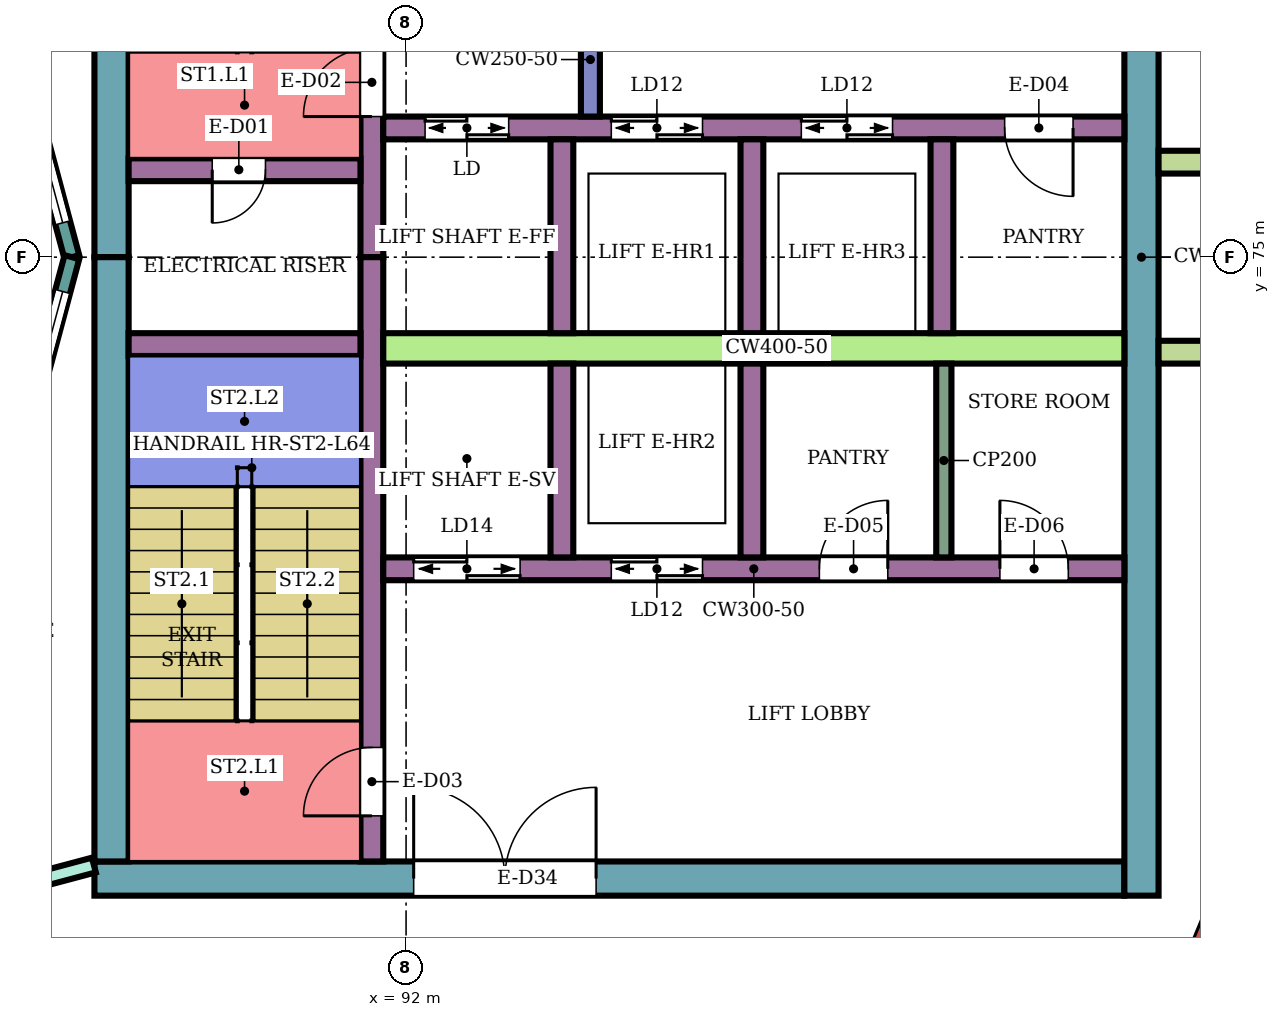
"""IFC4 building model, lengths in metres.
Left out: names, types, materials, properties, quantities, classifications, styles, units other than length and angle.
Written with IfcOpenShell. Run it as: python <this file> out.ifc"""

import sys

from ifc_helpers import new_model, si_unit, direction, frame, frame_2d, origin, place, context, subcontext, project, spatial, rectangle, extrude, element, fill, save


model = new_model("IFC4")
c1 = context("Model", 3, precision=1e-05, world=origin(), true_north=direction((0.0, 1.0)))
c2 = subcontext(c1, "Body", "Model", "MODEL_VIEW")
j1 = project(units=[si_unit("LENGTHUNIT", "METRE"), si_unit("PLANEANGLEUNIT", "RADIAN")], contexts=[c1])
p1 = place(None, origin())
s1 = spatial("IfcSite", under=j1, at=p1, CompositionType="ELEMENT")
p2 = place(p1, origin())
s2 = spatial("IfcBuilding", under=s1, at=p2, CompositionType="ELEMENT")
p3 = place(p2, frame((0.0, 0.0, 279.9)))
s3 = spatial("IfcBuildingStorey", under=s2, at=p3, CompositionType="ELEMENT", Elevation=279.9)
p4 = place(p3, frame((87.9, 66.825, 0.0), z_axis=(0.0, 0.0, 1.0), x_axis=(1.0, 0.0, 0.0)))
e1 = element("IfcWall", 1, at=p4, inside=s3, PredefinedType="SHEAR", context=c2, shape_type="SweptSolid", body=[
    extrude(rectangle(XDim=13.55, YDim=0.45, at=frame_2d((6.775, 0.0))), origin(), (0.0, 0.0, 1.0), 3.88),
])
p5 = place(p4, frame((4.2, 0.0, 0.0)))
e2 = element("IfcOpeningElement", 2, at=p5, cuts=e1, PredefinedType="OPENING", context=c2, shape_type="SweptSolid", body=[
    extrude(rectangle(XDim=2.4, YDim=2.4, at=frame_2d((1.2, 1.2))), frame((0.0, 0.235, 0.0), z_axis=(0.0, -1.0, 0.0), x_axis=(1.0, 0.0, 0.0)), (0.0, 0.0, 1.0), 0.47),
])
for number, where, z_axis, x_axis in (
    (3, (88.125, 75.0, 0.0), (0.0, 0.0, 1.0), (0.0, 1.0, 0.0)),
    (4, (88.125, 67.05, 0.0), (0.0, 0.0, 1.0), (0.0, 1.0, 0.0)),
):
    element("IfcWall", number, at=place(p3, frame(where, z_axis=z_axis, x_axis=x_axis)), inside=s3, PredefinedType="SHEAR", context=c2, shape_type="SweptSolid", body=[
        extrude(rectangle(XDim=7.95, YDim=0.45, at=frame_2d((3.975, 0.0))), origin(), (0.0, 0.0, 1.0), 3.88),
    ])
p6 = place(p3, frame((101.675, 66.6, 0.0), z_axis=(0.0, 0.0, 1.0), x_axis=(0.0, 1.0, 0.0)))
e5 = element("IfcWall", 5, at=p6, inside=s3, PredefinedType="SHEAR", context=c2, shape_type="SweptSolid", body=[
    extrude(rectangle(XDim=16.8, YDim=0.45, at=frame_2d((8.4, 0.0))), origin(), (0.0, 0.0, 1.0), 3.88),
])
p7 = place(p3, frame((91.55, 75.0, 0.0), z_axis=(0.0, 0.0, 1.0), x_axis=(0.0, 1.0, 0.0)))
e6 = element("IfcWall", 6, at=p7, inside=s3, PredefinedType="SHEAR", context=c2, shape_type="SweptSolid", body=[
    extrude(rectangle(XDim=7.95, YDim=0.3, at=frame_2d((3.975, 0.0))), origin(), (0.0, 0.0, 1.0), 3.88),
])
p8 = place(p7, frame((1.85, 0.0, 0.0)))
e7 = element("IfcOpeningElement", 7, at=p8, cuts=e6, PredefinedType="OPENING", context=c2, shape_type="SweptSolid", body=[
    extrude(rectangle(XDim=0.9, YDim=2.1, at=frame_2d((0.45, 1.05))), frame((0.0, 0.16, 0.0), z_axis=(0.0, -1.0, 0.0), x_axis=(1.0, 0.0, 0.0)), (0.0, 0.0, 1.0), 0.32),
])
p9 = place(p3, frame((91.55, 67.05, 0.0), z_axis=(0.0, 0.0, 1.0), x_axis=(0.0, 1.0, 0.0)))
e8 = element("IfcWall", 8, at=p9, inside=s3, PredefinedType="SHEAR", context=c2, shape_type="SweptSolid", body=[
    extrude(rectangle(XDim=7.95, YDim=0.3, at=frame_2d((3.975, 0.0))), origin(), (0.0, 0.0, 1.0), 3.88),
])
p10 = place(p9, frame((0.6, 0.0, 0.0)))
e9 = element("IfcOpeningElement", 9, at=p10, cuts=e8, PredefinedType="OPENING", context=c2, shape_type="SweptSolid", body=[
    extrude(rectangle(XDim=0.9, YDim=2.1, at=frame_2d((0.45, 1.05))), frame((0.0, 0.16, 0.0), z_axis=(0.0, -1.0, 0.0), x_axis=(1.0, 0.0, 0.0)), (0.0, 0.0, 1.0), 0.32),
])
p11 = place(p3, frame((88.35, 76.15, 0.0), z_axis=(0.0, 0.0, 1.0), x_axis=(1.0, 0.0, 0.0)))
e10 = element("IfcWall", 10, at=p11, inside=s3, PredefinedType="SHEAR", context=c2, shape_type="SweptSolid", body=[
    extrude(rectangle(XDim=3.05, YDim=0.3, at=frame_2d((1.525, 0.0))), origin(), (0.0, 0.0, 1.0), 3.88),
])
p12 = place(p11, frame((1.1, 0.0, 0.0)))
e11 = element("IfcOpeningElement", 11, at=p12, cuts=e10, PredefinedType="OPENING", context=c2, shape_type="SweptSolid", body=[
    extrude(rectangle(XDim=0.7, YDim=2.0, at=frame_2d((0.35, 1.0))), frame((0.0, 0.16, 0.0), z_axis=(0.0, -1.0, 0.0), x_axis=(1.0, 0.0, 0.0)), (0.0, 0.0, 1.0), 0.32),
])
p13 = place(p3, frame((88.35, 73.85, 0.0), z_axis=(0.0, 0.0, 1.0), x_axis=(1.0, 0.0, 0.0)))
e12 = element("IfcWall", 12, at=p13, inside=s3, PredefinedType="SHEAR", context=c2, shape_type="SweptSolid", body=[
    extrude(rectangle(XDim=3.05, YDim=0.3, at=frame_2d((1.525, 0.0))), origin(), (0.0, 0.0, 1.0), 3.88),
])
p14 = place(p3, frame((91.7, 76.7, 0.0), z_axis=(0.0, 0.0, 1.0), x_axis=(1.0, 0.0, 0.0)))
e13 = element("IfcWall", 13, at=p14, inside=s3, PredefinedType="SHEAR", context=c2, shape_type="SweptSolid", body=[
    extrude(rectangle(XDim=9.75, YDim=0.3, at=frame_2d((4.875, 0.0))), origin(), (0.0, 0.0, 1.0), 3.88),
])
p15 = place(p14, frame((0.55, 0.0, 0.0)))
e14 = element("IfcOpeningElement", 14, at=p15, cuts=e13, PredefinedType="OPENING", context=c2, shape_type="SweptSolid", body=[
    extrude(rectangle(XDim=1.1, YDim=2.1, at=frame_2d((0.55, 1.05))), frame((0.0, 0.16, 0.0), z_axis=(0.0, -1.0, 0.0), x_axis=(1.0, 0.0, 0.0)), (0.0, 0.0, 1.0), 0.32),
])
p16 = place(p14, frame((3.0, 0.0, 0.0)))
e15 = element("IfcOpeningElement", 15, at=p16, cuts=e13, PredefinedType="OPENING", context=c2, shape_type="SweptSolid", body=[
    extrude(rectangle(XDim=1.2, YDim=2.1, at=frame_2d((0.6, 1.05))), frame((0.0, 0.16, 0.0), z_axis=(0.0, -1.0, 0.0), x_axis=(1.0, 0.0, 0.0)), (0.0, 0.0, 1.0), 0.32),
])
p17 = place(p14, frame((5.5, 0.0, 0.0)))
e16 = element("IfcOpeningElement", 16, at=p17, cuts=e13, PredefinedType="OPENING", context=c2, shape_type="SweptSolid", body=[
    extrude(rectangle(XDim=1.2, YDim=2.1, at=frame_2d((0.6, 1.05))), frame((0.0, 0.16, 0.0), z_axis=(0.0, -1.0, 0.0), x_axis=(1.0, 0.0, 0.0)), (0.0, 0.0, 1.0), 0.32),
])
p18 = place(p14, frame((8.175, 0.0, 0.0)))
e17 = element("IfcOpeningElement", 17, at=p18, cuts=e13, PredefinedType="OPENING", context=c2, shape_type="SweptSolid", body=[
    extrude(rectangle(XDim=0.9, YDim=2.1, at=frame_2d((0.45, 1.05))), frame((0.0, 0.16, 0.0), z_axis=(0.0, -1.0, 0.0), x_axis=(1.0, 0.0, 0.0)), (0.0, 0.0, 1.0), 0.32),
])
p19 = place(p3, frame((91.7, 73.8, 0.0), z_axis=(0.0, 0.0, 1.0), x_axis=(1.0, 0.0, 0.0)))
e18 = element("IfcWall", 18, at=p19, inside=s3, PredefinedType="SHEAR", context=c2, shape_type="SweptSolid", body=[
    extrude(rectangle(XDim=9.75, YDim=0.4, at=frame_2d((4.875, 0.0))), origin(), (0.0, 0.0, 1.0), 3.88),
])
p20 = place(p3, frame((91.7, 70.9, 0.0), z_axis=(0.0, 0.0, 1.0), x_axis=(1.0, 0.0, 0.0)))
e19 = element("IfcWall", 19, at=p20, inside=s3, PredefinedType="SHEAR", context=c2, shape_type="SweptSolid", body=[
    extrude(rectangle(XDim=9.75, YDim=0.3, at=frame_2d((4.875, 0.0))), origin(), (0.0, 0.0, 1.0), 3.88),
])
p21 = place(p20, frame((0.4, 0.0, 0.0)))
e20 = element("IfcOpeningElement", 20, at=p21, cuts=e19, PredefinedType="OPENING", context=c2, shape_type="SweptSolid", body=[
    extrude(rectangle(XDim=1.4, YDim=2.1, at=frame_2d((0.7, 1.05))), frame((0.0, 0.16, 0.0), z_axis=(0.0, -1.0, 0.0), x_axis=(1.0, 0.0, 0.0)), (0.0, 0.0, 1.0), 0.32),
])
p22 = place(p20, frame((3.0, 0.0, 0.0)))
e21 = element("IfcOpeningElement", 21, at=p22, cuts=e19, PredefinedType="OPENING", context=c2, shape_type="SweptSolid", body=[
    extrude(rectangle(XDim=1.2, YDim=2.1, at=frame_2d((0.6, 1.05))), frame((0.0, 0.16, 0.0), z_axis=(0.0, -1.0, 0.0), x_axis=(1.0, 0.0, 0.0)), (0.0, 0.0, 1.0), 0.32),
])
p23 = place(p20, frame((5.738, 0.0, 0.0)))
e22 = element("IfcOpeningElement", 22, at=p23, cuts=e19, PredefinedType="OPENING", context=c2, shape_type="SweptSolid", body=[
    extrude(rectangle(XDim=0.9, YDim=2.1, at=frame_2d((0.45, 1.05))), frame((0.0, 0.16, 0.0), z_axis=(0.0, -1.0, 0.0), x_axis=(1.0, 0.0, 0.0)), (0.0, 0.0, 1.0), 0.32),
])
p24 = place(p20, frame((8.113, 0.0, 0.0)))
e23 = element("IfcOpeningElement", 23, at=p24, cuts=e19, PredefinedType="OPENING", context=c2, shape_type="SweptSolid", body=[
    extrude(rectangle(XDim=0.9, YDim=2.1, at=frame_2d((0.45, 1.05))), frame((0.0, 0.16, 0.0), z_axis=(0.0, -1.0, 0.0), x_axis=(1.0, 0.0, 0.0)), (0.0, 0.0, 1.0), 0.32),
])
for number, where, z_axis, x_axis in (
    (24, (94.05, 74.0, 0.0), (0.0, 0.0, 1.0), (0.0, 1.0, 0.0)),
    (25, (96.55, 74.0, 0.0), (0.0, 0.0, 1.0), (0.0, 1.0, 0.0)),
    (26, (99.05, 74.0, 0.0), (0.0, 0.0, 1.0), (0.0, 1.0, 0.0)),
    (27, (94.05, 71.05, 0.0), (0.0, 0.0, 1.0), (0.0, 1.0, 0.0)),
    (28, (96.55, 71.05, 0.0), (0.0, 0.0, 1.0), (0.0, 1.0, 0.0)),
):
    element("IfcWall", number, at=place(p3, frame(where, z_axis=z_axis, x_axis=x_axis)), inside=s3, PredefinedType="SHEAR", context=c2, shape_type="SweptSolid", body=[
        extrude(rectangle(XDim=2.55, YDim=0.3, at=frame_2d((1.275, 0.0))), origin(), (0.0, 0.0, 1.0), 3.88),
    ])
p25 = place(p3, frame((94.425, 76.85, 0.0), z_axis=(0.0, 0.0, 1.0), x_axis=(0.0, 1.0, 0.0)))
e29 = element("IfcWall", 29, at=p25, inside=s3, PredefinedType="SHEAR", context=c2, shape_type="SweptSolid", body=[
    extrude(rectangle(XDim=1.5, YDim=0.25, at=frame_2d((0.75, 0.0))), origin(), (0.0, 0.0, 1.0), 3.88),
])
for number, where, z_axis, x_axis in (
    (30, (101.9, 73.75, 0.0), (0.0, 0.0, 1.0), (1.0, 0.0, 0.0)),
    (31, (101.9, 76.25, 0.0), (0.0, 0.0, 1.0), (1.0, 0.0, 0.0)),
):
    element("IfcWall", number, at=place(p3, frame(where, z_axis=z_axis, x_axis=x_axis)), inside=s3, PredefinedType="NOTDEFINED", context=c2, shape_type="SweptSolid", body=[
        extrude(rectangle(XDim=2.416, YDim=0.3, at=frame_2d((1.208, 0.0))), origin(), (0.0, 0.0, 1.0), 4.2),
    ])
p26 = place(p3, frame((87.604, 75.0, 0.0), z_axis=(0.0, 0.0, 1.0), x_axis=(-0.258789828301, 0.965933654434, 0.0)))
e32 = element("IfcWall", 32, at=p26, inside=s3, PredefinedType="NOTDEFINED", context=c2, shape_type="SweptSolid", body=[
    extrude(rectangle(XDim=3.936, YDim=0.2, at=frame_2d((1.968, 0.0))), origin(), (0.0, 0.0, 1.0), 4.2),
])
p27 = place(p26, frame((0.468, 0.0, 0.9)))
e33 = element("IfcOpeningElement", 33, at=p27, cuts=e32, PredefinedType="OPENING", context=c2, shape_type="SweptSolid", body=[
    extrude(rectangle(XDim=3.0, YDim=2.3, at=frame_2d((1.5, 1.15))), frame((0.0, 0.11, 0.0), z_axis=(0.0, -1.0, 0.0), x_axis=(1.0, 0.0, 0.0)), (0.0, 0.0, 1.0), 0.22),
])
p28 = place(p3, frame((86.585, 71.198, 0.0), z_axis=(0.0, 0.0, 1.0), x_axis=(0.258789828301, 0.965933654434, 0.0)))
e34 = element("IfcWall", 34, at=p28, inside=s3, PredefinedType="NOTDEFINED", context=c2, shape_type="SweptSolid", body=[
    extrude(rectangle(XDim=3.936, YDim=0.2, at=frame_2d((1.968, 0.0))), origin(), (0.0, 0.0, 1.0), 4.2),
])
p29 = place(p28, frame((0.468, 0.0, 0.9)))
e35 = element("IfcOpeningElement", 35, at=p29, cuts=e34, PredefinedType="OPENING", context=c2, shape_type="SweptSolid", body=[
    extrude(rectangle(XDim=3.0, YDim=2.3, at=frame_2d((1.5, 1.15))), frame((0.0, 0.11, 0.0), z_axis=(0.0, -1.0, 0.0), x_axis=(1.0, 0.0, 0.0)), (0.0, 0.0, 1.0), 0.22),
])
p30 = place(p3, frame((80.125, 64.932, 0.0), z_axis=(0.0, 0.0, 1.0), x_axis=(0.966236955806, 0.257655089674, 0.0)))
e36 = element("IfcWall", 36, at=p30, inside=s3, PredefinedType="PARTITIONING", context=c2, shape_type="SweptSolid", body=[
    extrude(rectangle(XDim=8.039, YDim=0.2, at=frame_2d((4.02, 0.0))), origin(), (0.0, 0.0, 1.0), 3.75),
])
p31 = place(p30, frame((6.298, 0.0, 0.0)))
e37 = element("IfcOpeningElement", 37, at=p31, cuts=e36, PredefinedType="OPENING", context=c2, shape_type="SweptSolid", body=[
    extrude(rectangle(XDim=0.9, YDim=2.1, at=frame_2d((0.45, 1.05))), frame((0.0, 0.11, 0.0), z_axis=(0.0, -1.0, 0.0), x_axis=(1.0, 0.0, 0.0)), (0.0, 0.0, 1.0), 0.22),
])
p32 = place(p30, frame((2.045, 0.0, 0.0)))
e38 = element("IfcOpeningElement", 38, at=p32, cuts=e36, PredefinedType="OPENING", context=c2, shape_type="SweptSolid", body=[
    extrude(rectangle(XDim=0.9, YDim=2.1, at=frame_2d((0.45, 1.05))), frame((0.0, 0.11, 0.0), z_axis=(0.0, -1.0, 0.0), x_axis=(1.0, 0.0, 0.0)), (0.0, 0.0, 1.0), 0.22),
])
p33 = place(p3, frame((99.075, 71.05, 0.0), z_axis=(0.0, 0.0, 1.0), x_axis=(0.0, 1.0, 0.0)))
e39 = element("IfcWall", 39, at=p33, inside=s3, PredefinedType="PARTITIONING", context=c2, shape_type="SweptSolid", body=[
    extrude(rectangle(XDim=2.55, YDim=0.2, at=frame_2d((1.275, 0.0))), origin(), (0.0, 0.0, 1.0), 3.88),
])
p34 = place(p27, origin())
e40 = element("IfcWindow", 40, at=p34, inside=s3, PartitioningType="SINGLE_PANEL", PredefinedType="WINDOW", context=c2, shape_type="SweptSolid", body=[
    extrude(rectangle(XDim=3.0, YDim=2.3, at=frame_2d((1.5, 1.15))), frame((0.0, 0.03, 0.0), z_axis=(0.0, -1.0, 0.0), x_axis=(1.0, 0.0, 0.0)), (0.0, 0.0, 1.0), 0.06),
])
fill(e33, e40)
p35 = place(p29, origin())
e41 = element("IfcWindow", 41, at=p35, inside=s3, PartitioningType="SINGLE_PANEL", PredefinedType="WINDOW", context=c2, shape_type="SweptSolid", body=[
    extrude(rectangle(XDim=3.0, YDim=2.3, at=frame_2d((1.5, 1.15))), frame((0.0, 0.03, 0.0), z_axis=(0.0, -1.0, 0.0), x_axis=(1.0, 0.0, 0.0)), (0.0, 0.0, 1.0), 0.06),
])
fill(e35, e41)
p36 = place(p12, frame((0.7, 0.0, 0.0), z_axis=(0.0, 0.0, 1.0), x_axis=(-1.0, 0.0, 0.0)))
e42 = element("IfcDoor", 42, at=p36, inside=s3, OperationType="SINGLE_SWING_RIGHT", PredefinedType="DOOR", context=c2, shape_type="SweptSolid", body=[
    extrude(rectangle(XDim=0.7, YDim=2.0, at=frame_2d((0.35, 1.0))), frame((0.0, 0.025, 0.0), z_axis=(0.0, -1.0, 0.0), x_axis=(1.0, 0.0, 0.0)), (0.0, 0.0, 1.0), 0.05),
])
fill(e11, e42)
p37 = place(p8, origin())
e43 = element("IfcDoor", 43, at=p37, inside=s3, OperationType="SINGLE_SWING_LEFT", PredefinedType="DOOR", context=c2, shape_type="SweptSolid", body=[
    extrude(rectangle(XDim=0.9, YDim=2.1, at=frame_2d((0.45, 1.05))), frame((0.0, 0.025, 0.0), z_axis=(0.0, -1.0, 0.0), x_axis=(1.0, 0.0, 0.0)), (0.0, 0.0, 1.0), 0.05),
])
fill(e7, e43)
p38 = place(p10, origin())
e44 = element("IfcDoor", 44, at=p38, inside=s3, OperationType="SINGLE_SWING_LEFT", PredefinedType="DOOR", context=c2, shape_type="SweptSolid", body=[
    extrude(rectangle(XDim=0.9, YDim=2.1, at=frame_2d((0.45, 1.05))), frame((0.0, 0.025, 0.0), z_axis=(0.0, -1.0, 0.0), x_axis=(1.0, 0.0, 0.0)), (0.0, 0.0, 1.0), 0.05),
])
fill(e9, e44)
p39 = place(p15, origin())
e45 = element("IfcDoor", 45, at=p39, inside=s3, OperationType="DOUBLE_DOOR_SLIDING", PredefinedType="DOOR", context=c2, shape_type="SweptSolid", body=[
    extrude(rectangle(XDim=1.1, YDim=2.1, at=frame_2d((0.55, 1.05))), frame((0.0, 0.025, 0.0), z_axis=(0.0, -1.0, 0.0), x_axis=(1.0, 0.0, 0.0)), (0.0, 0.0, 1.0), 0.05),
])
fill(e14, e45)
p40 = place(p16, origin())
e46 = element("IfcDoor", 46, at=p40, inside=s3, OperationType="DOUBLE_DOOR_SLIDING", PredefinedType="DOOR", context=c2, shape_type="SweptSolid", body=[
    extrude(rectangle(XDim=1.2, YDim=2.1, at=frame_2d((0.6, 1.05))), frame((0.0, 0.025, 0.0), z_axis=(0.0, -1.0, 0.0), x_axis=(1.0, 0.0, 0.0)), (0.0, 0.0, 1.0), 0.05),
])
fill(e15, e46)
p41 = place(p17, origin())
e47 = element("IfcDoor", 47, at=p41, inside=s3, OperationType="DOUBLE_DOOR_SLIDING", PredefinedType="DOOR", context=c2, shape_type="SweptSolid", body=[
    extrude(rectangle(XDim=1.2, YDim=2.1, at=frame_2d((0.6, 1.05))), frame((0.0, 0.025, 0.0), z_axis=(0.0, -1.0, 0.0), x_axis=(1.0, 0.0, 0.0)), (0.0, 0.0, 1.0), 0.05),
])
fill(e16, e47)
p42 = place(p18, frame((0.9, 0.0, 0.0), z_axis=(0.0, 0.0, 1.0), x_axis=(-1.0, 0.0, 0.0)))
e48 = element("IfcDoor", 48, at=p42, inside=s3, OperationType="SINGLE_SWING_LEFT", PredefinedType="DOOR", context=c2, shape_type="SweptSolid", body=[
    extrude(rectangle(XDim=0.9, YDim=2.1, at=frame_2d((0.45, 1.05))), frame((0.0, 0.025, 0.0), z_axis=(0.0, -1.0, 0.0), x_axis=(1.0, 0.0, 0.0)), (0.0, 0.0, 1.0), 0.05),
])
fill(e17, e48)
p43 = place(p21, origin())
e49 = element("IfcDoor", 49, at=p43, inside=s3, OperationType="DOUBLE_DOOR_SLIDING", PredefinedType="DOOR", context=c2, shape_type="SweptSolid", body=[
    extrude(rectangle(XDim=1.4, YDim=2.1, at=frame_2d((0.7, 1.05))), frame((0.0, 0.025, 0.0), z_axis=(0.0, -1.0, 0.0), x_axis=(1.0, 0.0, 0.0)), (0.0, 0.0, 1.0), 0.05),
])
fill(e20, e49)
p44 = place(p22, origin())
e50 = element("IfcDoor", 50, at=p44, inside=s3, OperationType="DOUBLE_DOOR_SLIDING", PredefinedType="DOOR", context=c2, shape_type="SweptSolid", body=[
    extrude(rectangle(XDim=1.2, YDim=2.1, at=frame_2d((0.6, 1.05))), frame((0.0, 0.025, 0.0), z_axis=(0.0, -1.0, 0.0), x_axis=(1.0, 0.0, 0.0)), (0.0, 0.0, 1.0), 0.05),
])
fill(e21, e50)
p45 = place(p23, origin())
e51 = element("IfcDoor", 51, at=p45, inside=s3, OperationType="SINGLE_SWING_RIGHT", PredefinedType="DOOR", context=c2, shape_type="SweptSolid", body=[
    extrude(rectangle(XDim=0.9, YDim=2.1, at=frame_2d((0.45, 1.05))), frame((0.0, 0.025, 0.0), z_axis=(0.0, -1.0, 0.0), x_axis=(1.0, 0.0, 0.0)), (0.0, 0.0, 1.0), 0.05),
])
fill(e22, e51)
p46 = place(p24, origin())
e52 = element("IfcDoor", 52, at=p46, inside=s3, OperationType="SINGLE_SWING_LEFT", PredefinedType="DOOR", context=c2, shape_type="SweptSolid", body=[
    extrude(rectangle(XDim=0.9, YDim=2.1, at=frame_2d((0.45, 1.05))), frame((0.0, 0.025, 0.0), z_axis=(0.0, -1.0, 0.0), x_axis=(1.0, 0.0, 0.0)), (0.0, 0.0, 1.0), 0.05),
])
fill(e23, e52)
p47 = place(p5, origin())
e53 = element("IfcDoor", 53, at=p47, inside=s3, OperationType="DOUBLE_DOOR_SINGLE_SWING", PredefinedType="DOOR", context=c2, shape_type="SweptSolid", body=[
    extrude(rectangle(XDim=2.4, YDim=2.4, at=frame_2d((1.2, 1.2))), frame((0.0, 0.025, 0.0), z_axis=(0.0, -1.0, 0.0), x_axis=(1.0, 0.0, 0.0)), (0.0, 0.0, 1.0), 0.05),
])
fill(e2, e53)
save(model, sys.argv[1])
